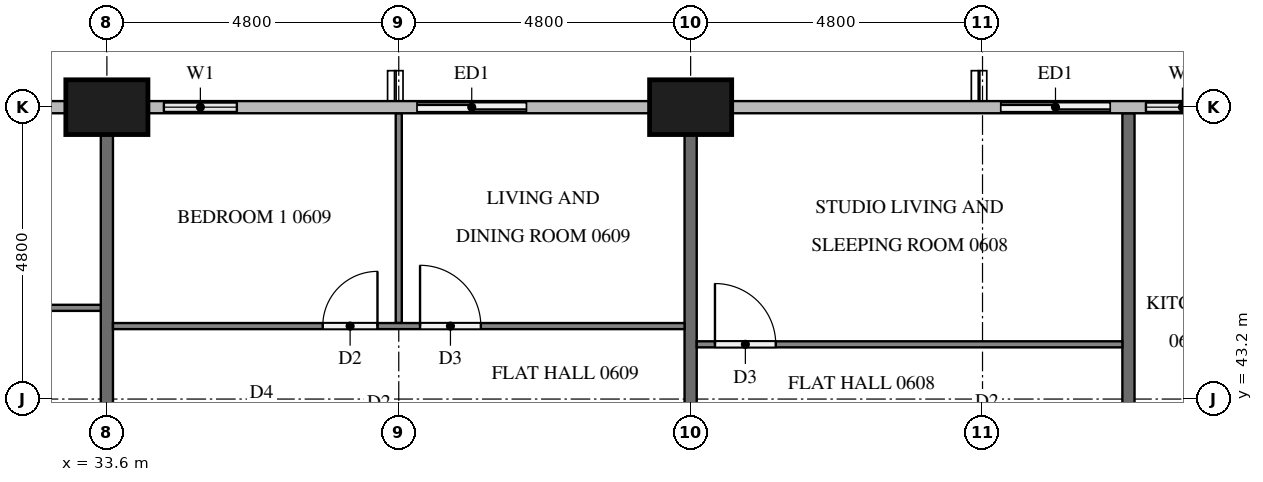
"""IFC4 building model, lengths in metres.
Left out: names, types, materials, properties, quantities, classifications, styles, units other than length and angle.
Written with IfcOpenShell. Run it as: python <this file> out.ifc"""

import sys

from ifc_helpers import new_model, si_unit, direction, frame, frame_2d, origin, origin_2d, place, context, subcontext, project, spatial, rectangle, extrude, element, fill, save


model = new_model("IFC4")
c1 = context("Model", 3, precision=1e-05, world=origin(), true_north=direction((0.0, 1.0)))
c2 = subcontext(c1, "Body", "Model", "MODEL_VIEW")
j1 = project(units=[si_unit("LENGTHUNIT", "METRE"), si_unit("PLANEANGLEUNIT", "RADIAN")], contexts=[c1])
p1 = place(None, origin())
s1 = spatial("IfcSite", under=j1, at=p1, CompositionType="ELEMENT")
p2 = place(p1, origin())
s2 = spatial("IfcBuilding", under=s1, at=p2, CompositionType="ELEMENT")
p3 = place(p2, frame((0.0, 0.0, 29.4)))
s3 = spatial("IfcBuildingStorey", under=s2, at=p3, CompositionType="ELEMENT", Elevation=29.4)
for number, where, z_axis, x_axis in (
    (1, (43.2, 48.0, 0.0), (0.0, 0.0, 1.0), (1.0, 0.0, 0.0)),
    (2, (33.6, 48.0, 0.0), (0.0, 0.0, 1.0), (1.0, 0.0, 0.0)),
):
    element("IfcColumn", number, at=place(p3, frame(where, z_axis=z_axis, x_axis=x_axis)), inside=s3, PredefinedType="COLUMN", context=c2, shape_type="SweptSolid", body=[
        extrude(rectangle(XDim=1.35, YDim=0.9, at=origin_2d()), origin(), (0.0, 0.0, 1.0), 3.2),
    ])
p4 = place(p3, frame((52.175, 48.0, 0.0), z_axis=(0.0, 0.0, 1.0), x_axis=(-1.0, 0.0, 0.0)))
e3 = element("IfcWall", 3, at=p4, inside=s3, PredefinedType="SOLIDWALL", context=c2, shape_type="SweptSolid", body=[
    extrude(rectangle(XDim=4.175, YDim=0.15, at=frame_2d((2.087, 0.0))), origin(), (0.0, 0.0, 1.0), 3.2),
])
p5 = place(p4, frame((0.288, 0.0, 0.9)))
e4 = element("IfcOpeningElement", 4, at=p5, cuts=e3, PredefinedType="OPENING", context=c2, shape_type="SweptSolid", body=[
    extrude(rectangle(XDim=1.2, YDim=1.4, at=frame_2d((0.6, 0.7))), frame((0.0, 0.085, 0.0), z_axis=(0.0, -1.0, 0.0), x_axis=(1.0, 0.0, 0.0)), (0.0, 0.0, 1.0), 0.17),
])
p6 = place(p4, frame((2.075, 0.0, 0.0)))
e5 = element("IfcOpeningElement", 5, at=p6, cuts=e3, PredefinedType="OPENING", context=c2, shape_type="SweptSolid", body=[
    extrude(rectangle(XDim=1.8, YDim=2.4, at=frame_2d((0.9, 1.2))), frame((0.0, 0.085, 0.0), z_axis=(0.0, -1.0, 0.0), x_axis=(1.0, 0.0, 0.0)), (0.0, 0.0, 1.0), 0.17),
])
p7 = place(p3, frame((40.8, 48.0, 0.0), z_axis=(0.0, 0.0, 1.0), x_axis=(-1.0, 0.0, 0.0)))
e6 = element("IfcWall", 6, at=p7, inside=s3, PredefinedType="SOLIDWALL", context=c2, shape_type="SweptSolid", body=[
    extrude(rectangle(XDim=2.4, YDim=0.15, at=frame_2d((1.2, 0.0))), origin(), (0.0, 0.0, 1.0), 3.2),
])
p8 = place(p7, frame((0.3, 0.0, 0.0)))
e7 = element("IfcOpeningElement", 7, at=p8, cuts=e6, PredefinedType="OPENING", context=c2, shape_type="SweptSolid", body=[
    extrude(rectangle(XDim=1.8, YDim=2.4, at=frame_2d((0.9, 1.2))), frame((0.0, 0.085, 0.0), z_axis=(0.0, -1.0, 0.0), x_axis=(1.0, 0.0, 0.0)), (0.0, 0.0, 1.0), 0.17),
])
p9 = place(p3, frame((36.0, 48.0, 0.0), z_axis=(0.0, 0.0, 1.0), x_axis=(-1.0, 0.0, 0.0)))
e8 = element("IfcWall", 8, at=p9, inside=s3, PredefinedType="SOLIDWALL", context=c2, shape_type="SweptSolid", body=[
    extrude(rectangle(XDim=1.725, YDim=0.15, at=frame_2d((0.863, 0.0))), origin(), (0.0, 0.0, 1.0), 3.2),
])
p10 = place(p9, frame((0.262, 0.0, 0.9)))
e9 = element("IfcOpeningElement", 9, at=p10, cuts=e8, PredefinedType="OPENING", context=c2, shape_type="SweptSolid", body=[
    extrude(rectangle(XDim=1.2, YDim=1.4, at=frame_2d((0.6, 0.7))), frame((0.0, 0.085, 0.0), z_axis=(0.0, -1.0, 0.0), x_axis=(1.0, 0.0, 0.0)), (0.0, 0.0, 1.0), 0.17),
])
p11 = place(p3, frame((32.925, 48.0, 0.0), z_axis=(0.0, 0.0, 1.0), x_axis=(-1.0, 0.0, 0.0)))
e10 = element("IfcWall", 10, at=p11, inside=s3, PredefinedType="SOLIDWALL", context=c2, shape_type="SweptSolid", body=[
    extrude(rectangle(XDim=1.725, YDim=0.15, at=frame_2d((0.863, 0.0))), origin(), (0.0, 0.0, 1.0), 3.2),
])
p12 = place(p11, frame((0.262, 0.0, 0.9)))
e11 = element("IfcOpeningElement", 11, at=p12, cuts=e10, PredefinedType="OPENING", context=c2, shape_type="SweptSolid", body=[
    extrude(rectangle(XDim=1.2, YDim=1.4, at=frame_2d((0.6, 0.7))), frame((0.0, 0.085, 0.0), z_axis=(0.0, -1.0, 0.0), x_axis=(1.0, 0.0, 0.0)), (0.0, 0.0, 1.0), 0.17),
])
p13 = place(p3, frame((50.4, 40.9, 0.0), z_axis=(0.0, 0.0, 1.0), x_axis=(0.0, 1.0, 0.0)))
e12 = element("IfcWall", 12, at=p13, inside=s3, PredefinedType="PARTITIONING", context=c2, shape_type="SweptSolid", body=[
    extrude(rectangle(XDim=7.0, YDim=0.2, at=frame_2d((3.5, 0.0))), origin(), (0.0, 0.0, 1.0), 3.2),
])
for number, where, z_axis, x_axis in (
    (13, (43.2, 47.55, 0.0), (0.0, 0.0, 1.0), (0.0, -1.0, 0.0)),
    (14, (33.6, 47.55, 0.0), (0.0, 0.0, 1.0), (0.0, -1.0, 0.0)),
):
    element("IfcWall", number, at=place(p3, frame(where, z_axis=z_axis, x_axis=x_axis)), inside=s3, PredefinedType="PARTITIONING", context=c2, shape_type="SweptSolid", body=[
        extrude(rectangle(XDim=6.65, YDim=0.2, at=frame_2d((3.325, 0.0))), origin(), (0.0, 0.0, 1.0), 3.2),
    ])
p14 = place(p3, frame((43.3, 44.1, 0.0), z_axis=(0.0, 0.0, 1.0), x_axis=(1.0, 0.0, 0.0)))
e15 = element("IfcWall", 15, at=p14, inside=s3, PredefinedType="PARTITIONING", context=c2, shape_type="SweptSolid", body=[
    extrude(rectangle(XDim=7.0, YDim=0.1, at=frame_2d((3.5, 0.0))), origin(), (0.0, 0.0, 1.0), 3.2),
])
p15 = place(p14, frame((0.3, 0.0, 0.0)))
e16 = element("IfcOpeningElement", 16, at=p15, cuts=e15, PredefinedType="OPENING", context=c2, shape_type="SweptSolid", body=[
    extrude(rectangle(XDim=1.0, YDim=2.1, at=frame_2d((0.5, 1.05))), frame((0.0, 0.06, 0.0), z_axis=(0.0, -1.0, 0.0), x_axis=(1.0, 0.0, 0.0)), (0.0, 0.0, 1.0), 0.12),
])
p16 = place(p3, frame((38.4, 44.45, 0.0), z_axis=(0.0, 0.0, 1.0), x_axis=(0.0, 1.0, 0.0)))
e17 = element("IfcWall", 17, at=p16, inside=s3, PredefinedType="PARTITIONING", context=c2, shape_type="SweptSolid", body=[
    extrude(rectangle(XDim=3.45, YDim=0.1, at=frame_2d((1.725, 0.0))), origin(), (0.0, 0.0, 1.0), 3.2),
])
p17 = place(p3, frame((33.7, 44.4, 0.0), z_axis=(0.0, 0.0, 1.0), x_axis=(1.0, 0.0, 0.0)))
e18 = element("IfcWall", 18, at=p17, inside=s3, PredefinedType="PARTITIONING", context=c2, shape_type="SweptSolid", body=[
    extrude(rectangle(XDim=9.4, YDim=0.1, at=frame_2d((4.7, 0.0))), origin(), (0.0, 0.0, 1.0), 3.2),
])
p18 = place(p17, frame((5.05, 0.0, 0.0)))
e19 = element("IfcOpeningElement", 19, at=p18, cuts=e18, PredefinedType="OPENING", context=c2, shape_type="SweptSolid", body=[
    extrude(rectangle(XDim=1.0, YDim=2.1, at=frame_2d((0.5, 1.05))), frame((0.0, 0.06, 0.0), z_axis=(0.0, -1.0, 0.0), x_axis=(1.0, 0.0, 0.0)), (0.0, 0.0, 1.0), 0.12),
])
p19 = place(p17, frame((3.45, 0.0, 0.0)))
e20 = element("IfcOpeningElement", 20, at=p19, cuts=e18, PredefinedType="OPENING", context=c2, shape_type="SweptSolid", body=[
    extrude(rectangle(XDim=0.9, YDim=2.1, at=frame_2d((0.45, 1.05))), frame((0.0, 0.06, 0.0), z_axis=(0.0, -1.0, 0.0), x_axis=(1.0, 0.0, 0.0)), (0.0, 0.0, 1.0), 0.12),
])
p20 = place(p3, frame((14.5, 44.7, 0.0), z_axis=(0.0, 0.0, 1.0), x_axis=(1.0, 0.0, 0.0)))
e21 = element("IfcWall", 21, at=p20, inside=s3, PredefinedType="PARTITIONING", context=c2, shape_type="SweptSolid", body=[
    extrude(rectangle(XDim=19.0, YDim=0.1, at=frame_2d((9.5, 0.0))), origin(), (0.0, 0.0, 1.0), 3.2),
])
p21 = place(p20, frame((3.45, 0.0, 0.0)))
e22 = element("IfcOpeningElement", 22, at=p21, cuts=e21, PredefinedType="OPENING", context=c2, shape_type="SweptSolid", body=[
    extrude(rectangle(XDim=0.9, YDim=2.1, at=frame_2d((0.45, 1.05))), frame((0.0, 0.06, 0.0), z_axis=(0.0, -1.0, 0.0), x_axis=(1.0, 0.0, 0.0)), (0.0, 0.0, 1.0), 0.12),
])
p22 = place(p20, frame((5.05, 0.0, 0.0)))
e23 = element("IfcOpeningElement", 23, at=p22, cuts=e21, PredefinedType="OPENING", context=c2, shape_type="SweptSolid", body=[
    extrude(rectangle(XDim=0.9, YDim=2.1, at=frame_2d((0.45, 1.05))), frame((0.0, 0.06, 0.0), z_axis=(0.0, -1.0, 0.0), x_axis=(1.0, 0.0, 0.0)), (0.0, 0.0, 1.0), 0.12),
])
p23 = place(p20, frame((12.95, 0.0, 0.0)))
e24 = element("IfcOpeningElement", 24, at=p23, cuts=e21, PredefinedType="OPENING", context=c2, shape_type="SweptSolid", body=[
    extrude(rectangle(XDim=1.0, YDim=2.1, at=frame_2d((0.5, 1.05))), frame((0.0, 0.06, 0.0), z_axis=(0.0, -1.0, 0.0), x_axis=(1.0, 0.0, 0.0)), (0.0, 0.0, 1.0), 0.12),
])
p24 = place(p20, frame((14.65, 0.0, 0.0)))
e25 = element("IfcOpeningElement", 25, at=p24, cuts=e21, PredefinedType="OPENING", context=c2, shape_type="SweptSolid", body=[
    extrude(rectangle(XDim=0.9, YDim=2.1, at=frame_2d((0.45, 1.05))), frame((0.0, 0.06, 0.0), z_axis=(0.0, -1.0, 0.0), x_axis=(1.0, 0.0, 0.0)), (0.0, 0.0, 1.0), 0.12),
])
p25 = place(p5, origin())
e26 = element("IfcWindow", 26, at=p25, inside=s3, PartitioningType="SINGLE_PANEL", PredefinedType="WINDOW", context=c2, shape_type="SweptSolid", body=[
    extrude(rectangle(XDim=1.2, YDim=1.4, at=frame_2d((0.6, 0.7))), frame((0.0, 0.03, 0.0), z_axis=(0.0, -1.0, 0.0), x_axis=(1.0, 0.0, 0.0)), (0.0, 0.0, 1.0), 0.06),
])
fill(e4, e26)
p26 = place(p6, origin())
e27 = element("IfcDoor", 27, at=p26, inside=s3, OperationType="SLIDING_TO_LEFT", PredefinedType="DOOR", context=c2, shape_type="SweptSolid", body=[
    extrude(rectangle(XDim=1.8, YDim=2.4, at=frame_2d((0.9, 1.2))), frame((0.0, 0.025, 0.0), z_axis=(0.0, -1.0, 0.0), x_axis=(1.0, 0.0, 0.0)), (0.0, 0.0, 1.0), 0.05),
])
fill(e5, e27)
p27 = place(p8, origin())
e28 = element("IfcDoor", 28, at=p27, inside=s3, OperationType="SLIDING_TO_RIGHT", PredefinedType="DOOR", context=c2, shape_type="SweptSolid", body=[
    extrude(rectangle(XDim=1.8, YDim=2.4, at=frame_2d((0.9, 1.2))), frame((0.0, 0.025, 0.0), z_axis=(0.0, -1.0, 0.0), x_axis=(1.0, 0.0, 0.0)), (0.0, 0.0, 1.0), 0.05),
])
fill(e7, e28)
p28 = place(p10, origin())
e29 = element("IfcWindow", 29, at=p28, inside=s3, PartitioningType="SINGLE_PANEL", PredefinedType="WINDOW", context=c2, shape_type="SweptSolid", body=[
    extrude(rectangle(XDim=1.2, YDim=1.4, at=frame_2d((0.6, 0.7))), frame((0.0, 0.03, 0.0), z_axis=(0.0, -1.0, 0.0), x_axis=(1.0, 0.0, 0.0)), (0.0, 0.0, 1.0), 0.06),
])
fill(e9, e29)
p29 = place(p15, origin())
e30 = element("IfcDoor", 30, at=p29, inside=s3, OperationType="SINGLE_SWING_LEFT", PredefinedType="DOOR", context=c2, shape_type="SweptSolid", body=[
    extrude(rectangle(XDim=1.0, YDim=2.1, at=frame_2d((0.5, 1.05))), frame((0.0, 0.025, 0.0), z_axis=(0.0, -1.0, 0.0), x_axis=(1.0, 0.0, 0.0)), (0.0, 0.0, 1.0), 0.05),
])
fill(e16, e30)
p30 = place(p18, origin())
e31 = element("IfcDoor", 31, at=p30, inside=s3, OperationType="SINGLE_SWING_LEFT", PredefinedType="DOOR", context=c2, shape_type="SweptSolid", body=[
    extrude(rectangle(XDim=1.0, YDim=2.1, at=frame_2d((0.5, 1.05))), frame((0.0, 0.025, 0.0), z_axis=(0.0, -1.0, 0.0), x_axis=(1.0, 0.0, 0.0)), (0.0, 0.0, 1.0), 0.05),
])
fill(e19, e31)
p31 = place(p19, origin())
e32 = element("IfcDoor", 32, at=p31, inside=s3, OperationType="SINGLE_SWING_RIGHT", PredefinedType="DOOR", context=c2, shape_type="SweptSolid", body=[
    extrude(rectangle(XDim=0.9, YDim=2.1, at=frame_2d((0.45, 1.05))), frame((0.0, 0.025, 0.0), z_axis=(0.0, -1.0, 0.0), x_axis=(1.0, 0.0, 0.0)), (0.0, 0.0, 1.0), 0.05),
])
fill(e20, e32)
save(model, sys.argv[1])
